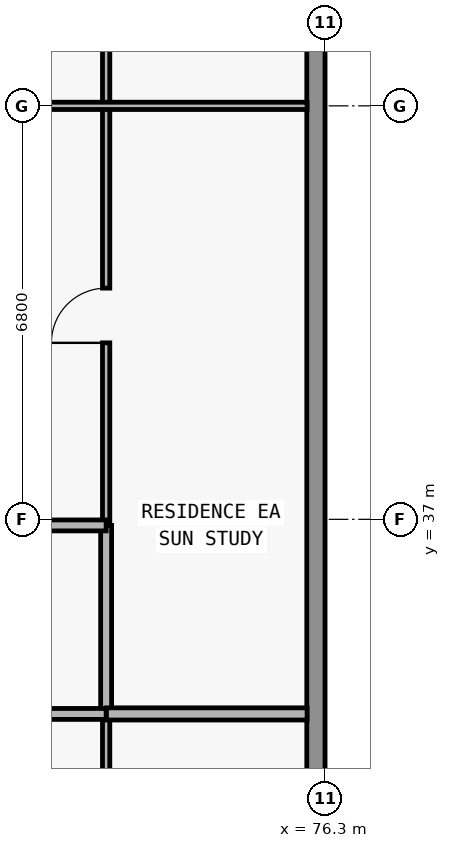
"""IFC4 building model, lengths in metres.
Left out: names, types, materials, properties, quantities, classifications, styles, units other than length and angle.
Written with IfcOpenShell. Run it as: python <this file> out.ifc"""

import sys

from ifc_helpers import new_model, si_unit, direction, frame, frame_2d, origin, place, context, subcontext, project, spatial, rectangle, extrude, element, fill, save


model = new_model("IFC4")
c1 = context("Model", 3, precision=1e-05, world=origin(), true_north=direction((0.0, 1.0)))
c2 = subcontext(c1, "Body", "Model", "MODEL_VIEW")
j1 = project(units=[si_unit("LENGTHUNIT", "METRE"), si_unit("PLANEANGLEUNIT", "RADIAN")], contexts=[c1])
p1 = place(None, origin())
s1 = spatial("IfcSite", under=j1, at=p1, CompositionType="ELEMENT")
p2 = place(p1, origin())
s2 = spatial("IfcBuilding", under=s1, at=p2, CompositionType="ELEMENT")
p3 = place(p2, frame((0.0, 0.0, 63.0)))
s3 = spatial("IfcBuildingStorey", under=s2, at=p3, CompositionType="ELEMENT", Elevation=63.0)
p4 = place(p3, frame((76.15, 47.4, 0.0), z_axis=(0.0, 0.0, 1.0), x_axis=(0.0, -1.0, 0.0)))
e1 = element("IfcWall", 1, at=p4, inside=s3, PredefinedType="STANDARD", context=c2, shape_type="SweptSolid", body=[
    extrude(rectangle(XDim=20.6, YDim=0.3, at=frame_2d((10.3, 0.0))), origin(), (0.0, 0.0, 1.0), 3.05),
])
p5 = place(p3, frame((72.7, 26.98, 0.0), z_axis=(0.0, 0.0, 1.0), x_axis=(0.0, 1.0, 0.0)))
e2 = element("IfcWall", 2, at=p5, inside=s3, PredefinedType="PARTITIONING", context=c2, shape_type="SweptSolid", body=[
    extrude(rectangle(XDim=6.82, YDim=0.12, at=frame_2d((3.41, 0.0))), origin(), (0.0, 0.0, 1.0), 3.05),
])
p6 = place(p3, frame((72.7, 33.805, 0.0), z_axis=(0.0, 0.0, 1.0), x_axis=(0.0, 1.0, 0.0)))
e3 = element("IfcWall", 3, at=p6, inside=s3, PredefinedType="PARTITIONING", context=c2, shape_type="SweptSolid", body=[
    extrude(rectangle(XDim=3.095, YDim=0.18, at=frame_2d((1.547, 0.0))), origin(), (0.0, 0.0, 1.0), 3.05),
])
p7 = place(p3, frame((72.7, 36.905, 0.0), z_axis=(0.0, 0.0, 1.0), x_axis=(0.0, 1.0, 0.0)))
e4 = element("IfcWall", 4, at=p7, inside=s3, PredefinedType="PARTITIONING", context=c2, shape_type="SweptSolid", body=[
    extrude(rectangle(XDim=10.375, YDim=0.12, at=frame_2d((5.188, 0.0))), origin(), (0.0, 0.0, 1.0), 3.05),
])
p8 = place(p7, frame((2.998, 0.0, 0.0)))
e5 = element("IfcOpeningElement", 5, at=p8, cuts=e4, PredefinedType="OPENING", context=c2, shape_type="SweptSolid", body=[
    extrude(rectangle(XDim=0.9, YDim=2.15, at=frame_2d((0.45, 1.075))), frame((0.0, 0.07, 0.0), z_axis=(0.0, -1.0, 0.0), x_axis=(1.0, 0.0, 0.0)), (0.0, 0.0, 1.0), 0.14),
])
p9 = place(p7, frame((8.185, 0.0, 0.0)))
e6 = element("IfcOpeningElement", 6, at=p9, cuts=e4, PredefinedType="OPENING", context=c2, shape_type="SweptSolid", body=[
    extrude(rectangle(XDim=0.9, YDim=2.15, at=frame_2d((0.45, 1.075))), frame((0.0, 0.07, 0.0), z_axis=(0.0, -1.0, 0.0), x_axis=(1.0, 0.0, 0.0)), (0.0, 0.0, 1.0), 0.14),
])
p10 = place(p3, frame((26.7, 33.8, 0.0), z_axis=(0.0, 0.0, 1.0), x_axis=(1.0, 0.0, 0.0)))
e7 = element("IfcWall", 7, at=p10, inside=s3, PredefinedType="PARTITIONING", context=c2, shape_type="SweptSolid", body=[
    extrude(rectangle(XDim=46.0, YDim=0.18, at=frame_2d((23.0, 0.0))), origin(), (0.0, 0.0, 1.0), 3.05),
])
p11 = place(p10, frame((2.95, 0.0, 0.0)))
e8 = element("IfcOpeningElement", 8, at=p11, cuts=e7, PredefinedType="OPENING", context=c2, shape_type="SweptSolid", body=[
    extrude(rectangle(XDim=1.0, YDim=2.2, at=frame_2d((0.5, 1.1))), frame((0.0, 0.1, 0.0), z_axis=(0.0, -1.0, 0.0), x_axis=(1.0, 0.0, 0.0)), (0.0, 0.0, 1.0), 0.2),
])
p12 = place(p10, frame((18.875, 0.0, 0.0)))
e9 = element("IfcOpeningElement", 9, at=p12, cuts=e7, PredefinedType="OPENING", context=c2, shape_type="SweptSolid", body=[
    extrude(rectangle(XDim=1.0, YDim=2.2, at=frame_2d((0.5, 1.1))), frame((0.0, 0.1, 0.0), z_axis=(0.0, -1.0, 0.0), x_axis=(1.0, 0.0, 0.0)), (0.0, 0.0, 1.0), 0.2),
])
p13 = place(p10, frame((27.275, 0.0, 0.0)))
e10 = element("IfcOpeningElement", 10, at=p13, cuts=e7, PredefinedType="OPENING", context=c2, shape_type="SweptSolid", body=[
    extrude(rectangle(XDim=1.0, YDim=2.2, at=frame_2d((0.5, 1.1))), frame((0.0, 0.1, 0.0), z_axis=(0.0, -1.0, 0.0), x_axis=(1.0, 0.0, 0.0)), (0.0, 0.0, 1.0), 0.2),
])
p14 = place(p10, frame((35.675, 0.0, 0.0)))
e11 = element("IfcOpeningElement", 11, at=p14, cuts=e7, PredefinedType="OPENING", context=c2, shape_type="SweptSolid", body=[
    extrude(rectangle(XDim=1.0, YDim=2.2, at=frame_2d((0.5, 1.1))), frame((0.0, 0.1, 0.0), z_axis=(0.0, -1.0, 0.0), x_axis=(1.0, 0.0, 0.0)), (0.0, 0.0, 1.0), 0.2),
])
p15 = place(p3, frame((72.705, 33.8, 0.0), z_axis=(0.0, 0.0, 1.0), x_axis=(1.0, 0.0, 0.0)))
e12 = element("IfcWall", 12, at=p15, inside=s3, PredefinedType="PARTITIONING", context=c2, shape_type="SweptSolid", body=[
    extrude(rectangle(XDim=3.3, YDim=0.2, at=frame_2d((1.65, 0.0))), origin(), (0.0, 0.0, 1.0), 3.05),
])
p16 = place(p3, frame((60.055, 36.9, 0.0), z_axis=(0.0, 0.0, 1.0), x_axis=(1.0, 0.0, 0.0)))
e13 = element("IfcWall", 13, at=p16, inside=s3, PredefinedType="PARTITIONING", context=c2, shape_type="SweptSolid", body=[
    extrude(rectangle(XDim=12.645, YDim=0.18, at=frame_2d((6.323, 0.0))), origin(), (0.0, 0.0, 1.0), 3.05),
])
p17 = place(p16, frame((4.52, 0.0, 0.0)))
e14 = element("IfcOpeningElement", 14, at=p17, cuts=e13, PredefinedType="OPENING", context=c2, shape_type="SweptSolid", body=[
    extrude(rectangle(XDim=1.0, YDim=2.2, at=frame_2d((0.5, 1.1))), frame((0.0, 0.1, 0.0), z_axis=(0.0, -1.0, 0.0), x_axis=(1.0, 0.0, 0.0)), (0.0, 0.0, 1.0), 0.2),
])
p18 = place(p3, frame((60.045, 43.8, 0.0), z_axis=(0.0, 0.0, 1.0), x_axis=(1.0, 0.0, 0.0)))
e15 = element("IfcWall", 15, at=p18, inside=s3, PredefinedType="PARTITIONING", context=c2, shape_type="SweptSolid", body=[
    extrude(rectangle(XDim=15.96, YDim=0.12, at=frame_2d((7.98, 0.0))), origin(), (0.0, 0.0, 1.0), 2.339),
])
p19 = place(p18, frame((9.805, 0.0, 0.0)))
e16 = element("IfcOpeningElement", 16, at=p19, cuts=e15, PredefinedType="OPENING", context=c2, shape_type="SweptSolid", body=[
    extrude(rectangle(XDim=0.9, YDim=2.15, at=frame_2d((0.45, 1.075))), frame((0.0, 0.07, 0.0), z_axis=(0.0, -1.0, 0.0), x_axis=(1.0, 0.0, 0.0)), (0.0, 0.0, 1.0), 0.14),
])
p20 = place(p18, frame((4.58, 0.0, 0.0)))
e17 = element("IfcOpeningElement", 17, at=p20, cuts=e15, PredefinedType="OPENING", context=c2, shape_type="SweptSolid", body=[
    extrude(rectangle(XDim=0.9, YDim=2.15, at=frame_2d((0.45, 1.075))), frame((0.0, 0.07, 0.0), z_axis=(0.0, -1.0, 0.0), x_axis=(1.0, 0.0, 0.0)), (0.0, 0.0, 1.0), 0.14),
])
p21 = place(p18, frame((0.677, 0.0, 0.0)))
e18 = element("IfcOpeningElement", 18, at=p21, cuts=e15, PredefinedType="OPENING", context=c2, shape_type="SweptSolid", body=[
    extrude(rectangle(XDim=0.85, YDim=2.1, at=frame_2d((0.425, 1.05))), frame((0.0, 0.07, 0.0), z_axis=(0.0, -1.0, 0.0), x_axis=(1.0, 0.0, 0.0)), (0.0, 0.0, 1.0), 0.14),
])
p22 = place(p8, origin())
e19 = element("IfcDoor", 19, at=p22, inside=s3, OperationType="SINGLE_SWING_LEFT", PredefinedType="DOOR", context=c2, shape_type="SweptSolid", body=[
    extrude(rectangle(XDim=0.9, YDim=2.15, at=frame_2d((0.45, 1.075))), frame((0.0, 0.025, 0.0), z_axis=(0.0, -1.0, 0.0), x_axis=(1.0, 0.0, 0.0)), (0.0, 0.0, 1.0), 0.05),
])
fill(e5, e19)
save(model, sys.argv[1])
